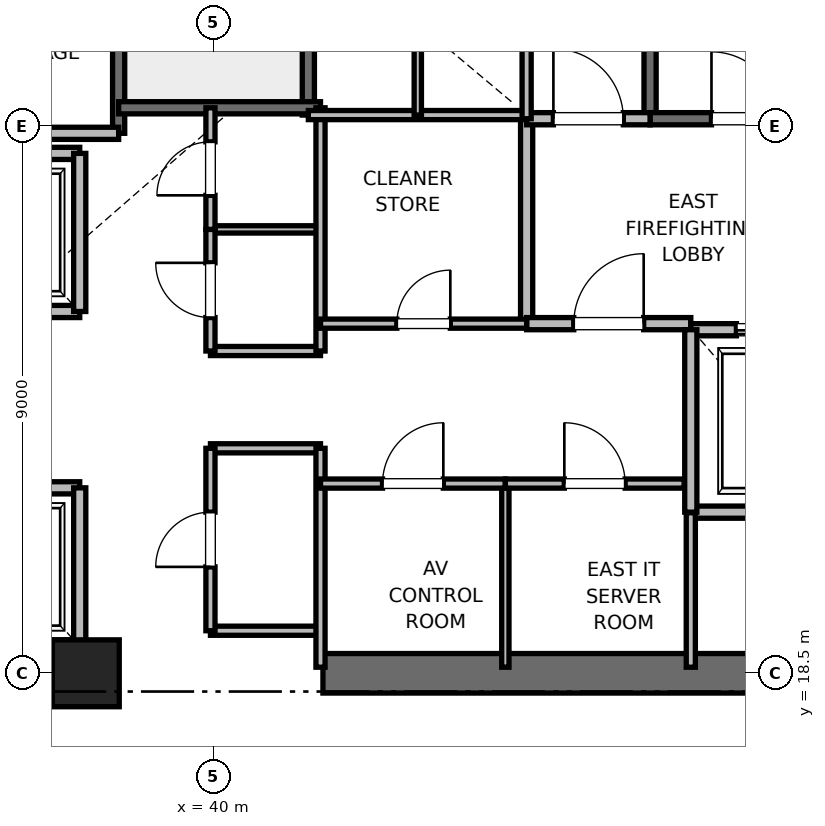
"""IFC4 building model, lengths in metres.
Left out: names, types, materials, properties, quantities, classifications, styles, units other than length and angle.
Written with IfcOpenShell. Run it as: python <this file> out.ifc"""

import sys

from ifc_helpers import new_model, si_unit, direction, frame, frame_2d, origin, origin_2d, place, context, subcontext, project, spatial, rectangle, extrude, element, fill, save


model = new_model("IFC4")
c1 = context("Model", 3, precision=1e-05, world=origin(), true_north=direction((0.0, 1.0)))
c2 = subcontext(c1, "Body", "Model", "MODEL_VIEW")
j1 = project(units=[si_unit("LENGTHUNIT", "METRE"), si_unit("PLANEANGLEUNIT", "RADIAN")], contexts=[c1])
p1 = place(None, origin())
s1 = spatial("IfcSite", under=j1, at=p1, CompositionType="ELEMENT")
p2 = place(p1, origin())
s2 = spatial("IfcBuilding", under=s1, at=p2, CompositionType="ELEMENT")
p3 = place(p2, frame((0.0, 0.0, 21.6)))
s3 = spatial("IfcBuildingStorey", under=s2, at=p3, CompositionType="ELEMENT", Elevation=21.6)
p4 = place(p3, frame((37.9, 18.5, 0.0), z_axis=(0.0, 0.0, 1.0), x_axis=(1.0, 0.0, 0.0)))
e1 = element("IfcColumn", 1, at=p4, inside=s3, PredefinedType="PILASTER", context=c2, shape_type="SweptSolid", body=[
    extrude(rectangle(XDim=1.1, YDim=1.1, at=origin_2d()), origin(), (0.0, 0.0, 1.0), 6.0),
])
for number, where, z_axis, x_axis in (
    (2, (29.0, 18.5, 0.0), (0.0, 0.0, 1.0), (1.0, 0.0, 0.0)),
    (3, (41.8, 18.5, 0.0), (0.0, 0.0, 1.0), (1.0, 0.0, 0.0)),
):
    element("IfcWall", number, at=place(p3, frame(where, z_axis=z_axis, x_axis=x_axis)), inside=s3, PredefinedType="SHEAR", context=c2, shape_type="SweptSolid", body=[
        extrude(rectangle(XDim=9.2, YDim=0.65, at=frame_2d((4.6, 0.0))), origin(), (0.0, 0.0, 1.0), 5.76),
    ])
p5 = place(p3, frame((47.18, 27.62, 0.0), z_axis=(0.0, 0.0, 1.0), x_axis=(0.0, 1.0, 0.0)))
e4 = element("IfcWall", 4, at=p5, inside=s3, PredefinedType="SOLIDWALL", context=c2, shape_type="SweptSolid", body=[
    extrude(rectangle(XDim=8.18, YDim=0.2, at=frame_2d((4.09, 0.0))), origin(), (0.0, 0.0, 1.0), 5.76),
])
p6 = place(p3, frame((47.18, 27.62, 0.0), z_axis=(0.0, 0.0, 1.0), x_axis=(1.0, 0.0, 0.0)))
e5 = element("IfcWall", 5, at=p6, inside=s3, PredefinedType="SOLIDWALL", context=c2, shape_type="SweptSolid", body=[
    extrude(rectangle(XDim=3.12, YDim=0.2, at=frame_2d((1.56, 0.0))), origin(), (0.0, 0.0, 1.0), 5.76),
])
p7 = place(p6, frame((1.01, 0.0, 0.0)))
e6 = element("IfcOpeningElement", 6, at=p7, cuts=e5, PredefinedType="OPENING", context=c2, shape_type="SweptSolid", body=[
    extrude(rectangle(XDim=1.1, YDim=2.15, at=frame_2d((0.55, 1.075))), frame((0.0, 0.1, 0.0), z_axis=(0.0, -1.0, 0.0), x_axis=(1.0, 0.0, 0.0)), (0.0, 0.0, 1.0), 0.2),
])
p8 = place(p3, frame((38.44, 27.38, 0.0), z_axis=(0.0, 0.0, 1.0), x_axis=(0.0, 1.0, 0.0)))
e7 = element("IfcWall", 7, at=p8, inside=s3, PredefinedType="SOLIDWALL", context=c2, shape_type="SweptSolid", body=[
    extrude(rectangle(XDim=8.87, YDim=0.2, at=frame_2d((4.435, 0.0))), origin(), (0.0, 0.0, 1.0), 5.76),
])
p9 = place(p3, frame((41.56, 27.68, 0.0), z_axis=(0.0, 0.0, 1.0), x_axis=(0.0, 1.0, 0.0)))
e8 = element("IfcWall", 8, at=p9, inside=s3, PredefinedType="SOLIDWALL", context=c2, shape_type="SweptSolid", body=[
    extrude(rectangle(XDim=8.57, YDim=0.2, at=frame_2d((4.285, 0.0))), origin(), (0.0, 0.0, 1.0), 5.76),
])
p10 = place(p3, frame((38.44, 27.8, 0.0), z_axis=(0.0, 0.0, 1.0), x_axis=(1.0, 0.0, 0.0)))
e9 = element("IfcWall", 9, at=p10, inside=s3, PredefinedType="SOLIDWALL", context=c2, shape_type="SweptSolid", body=[
    extrude(rectangle(XDim=3.32, YDim=0.2, at=frame_2d((1.66, 0.0))), origin(), (0.0, 0.0, 1.0), 5.76),
])
p11 = place(p3, frame((32.82, 27.38, 0.0), z_axis=(0.0, 0.0, 1.0), x_axis=(1.0, 0.0, 0.0)))
e10 = element("IfcWall", 10, at=p11, inside=s3, PredefinedType="PARTITIONING", context=c2, shape_type="SweptSolid", body=[
    extrude(rectangle(XDim=5.62, YDim=0.2, at=frame_2d((2.81, 0.0))), origin(), (0.0, 0.0, 1.0), 5.76),
])
p12 = place(p3, frame((45.15, 24.25, 0.0), z_axis=(0.0, 0.0, 1.0), x_axis=(0.0, 1.0, 0.0)))
e11 = element("IfcWall", 11, at=p12, inside=s3, PredefinedType="PARTITIONING", context=c2, shape_type="SweptSolid", body=[
    extrude(rectangle(XDim=3.37, YDim=0.2, at=frame_2d((1.685, 0.0))), origin(), (0.0, 0.0, 1.0), 5.76),
])
p13 = place(p3, frame((45.15, 24.25, 0.0), z_axis=(0.0, 0.0, 1.0), x_axis=(1.0, 0.0, 0.0)))
e12 = element("IfcWall", 12, at=p13, inside=s3, PredefinedType="PARTITIONING", context=c2, shape_type="SweptSolid", body=[
    extrude(rectangle(XDim=2.7, YDim=0.2, at=frame_2d((1.35, 0.0))), origin(), (0.0, 0.0, 1.0), 5.76),
])
p14 = place(p13, frame((0.775, 0.0, 0.0)))
e13 = element("IfcOpeningElement", 13, at=p14, cuts=e12, PredefinedType="OPENING", context=c2, shape_type="SweptSolid", body=[
    extrude(rectangle(XDim=1.15, YDim=2.2, at=frame_2d((0.575, 1.1))), frame((0.0, 0.1, 0.0), z_axis=(0.0, -1.0, 0.0), x_axis=(1.0, 0.0, 0.0)), (0.0, 0.0, 1.0), 0.2),
])
p15 = place(p3, frame((45.15, 27.62, 0.0), z_axis=(0.0, 0.0, 1.0), x_axis=(1.0, 0.0, 0.0)))
e14 = element("IfcWall", 14, at=p15, inside=s3, PredefinedType="PARTITIONING", context=c2, shape_type="SweptSolid", body=[
    extrude(rectangle(XDim=2.03, YDim=0.2, at=frame_2d((1.015, 0.0))), origin(), (0.0, 0.0, 1.0), 5.76),
])
p16 = place(p15, frame((0.44, 0.0, 0.0)))
e15 = element("IfcOpeningElement", 15, at=p16, cuts=e14, PredefinedType="OPENING", context=c2, shape_type="SweptSolid", body=[
    extrude(rectangle(XDim=1.15, YDim=2.2, at=frame_2d((0.575, 1.1))), frame((0.0, 0.1, 0.0), z_axis=(0.0, -1.0, 0.0), x_axis=(1.0, 0.0, 0.0)), (0.0, 0.0, 1.0), 0.2),
])
p17 = place(p3, frame((47.85, 21.15, 0.0), z_axis=(0.0, 0.0, 1.0), x_axis=(1.0, 0.0, 0.0)))
e16 = element("IfcWall", 16, at=p17, inside=s3, PredefinedType="SOLIDWALL", context=c2, shape_type="SweptSolid", body=[
    extrude(rectangle(XDim=2.6, YDim=0.2, at=frame_2d((1.3, 0.0))), origin(), (0.0, 0.0, 1.0), 5.76),
])
p18 = place(p3, frame((50.45, 24.15, 0.0), z_axis=(0.0, 0.0, 1.0), x_axis=(-1.0, 0.0, 0.0)))
e17 = element("IfcWall", 17, at=p18, inside=s3, PredefinedType="SOLIDWALL", context=c2, shape_type="SweptSolid", body=[
    extrude(rectangle(XDim=2.6, YDim=0.2, at=frame_2d((1.3, 0.0))), origin(), (0.0, 0.0, 1.0), 4.54),
])
p19 = place(p18, frame((0.75, 0.0, 0.0)))
e18 = element("IfcOpeningElement", 18, at=p19, cuts=e17, PredefinedType="OPENING", context=c2, shape_type="SweptSolid", body=[
    extrude(rectangle(XDim=1.1, YDim=2.2, at=frame_2d((0.55, 1.1))), frame((0.0, 0.1, 0.0), z_axis=(0.0, -1.0, 0.0), x_axis=(1.0, 0.0, 0.0)), (0.0, 0.0, 1.0), 0.2),
])
p20 = place(p3, frame((47.85, 24.15, 0.0), z_axis=(0.0, 0.0, 1.0), x_axis=(0.0, -1.0, 0.0)))
e19 = element("IfcWall", 19, at=p20, inside=s3, PredefinedType="SOLIDWALL", context=c2, shape_type="SweptSolid", body=[
    extrude(rectangle(XDim=3.0, YDim=0.2, at=frame_2d((1.5, 0.0))), origin(), (0.0, 0.0, 1.0), 5.76),
])
p21 = place(p3, frame((35.5, 18.95, 0.0), z_axis=(0.0, 0.0, 1.0), x_axis=(1.0, 0.0, 0.0)))
e20 = element("IfcWall", 20, at=p21, inside=s3, PredefinedType="SOLIDWALL", context=c2, shape_type="SweptSolid", body=[
    extrude(rectangle(XDim=2.3, YDim=0.2, at=frame_2d((1.15, 0.0))), origin(), (0.0, 0.0, 1.0), 4.54),
])
p22 = place(p3, frame((37.8, 21.55, 0.0), z_axis=(0.0, 0.0, 1.0), x_axis=(-1.0, 0.0, 0.0)))
e21 = element("IfcWall", 21, at=p22, inside=s3, PredefinedType="SOLIDWALL", context=c2, shape_type="SweptSolid", body=[
    extrude(rectangle(XDim=2.3, YDim=0.2, at=frame_2d((1.15, 0.0))), origin(), (0.0, 0.0, 1.0), 5.76),
])
p23 = place(p22, frame((0.6, 0.0, 0.0)))
e22 = element("IfcOpeningElement", 22, at=p23, cuts=e21, PredefinedType="OPENING", context=c2, shape_type="SweptSolid", body=[
    extrude(rectangle(XDim=1.1, YDim=2.2, at=frame_2d((0.55, 1.1))), frame((0.0, 0.1, 0.0), z_axis=(0.0, -1.0, 0.0), x_axis=(1.0, 0.0, 0.0)), (0.0, 0.0, 1.0), 0.2),
])
p24 = place(p3, frame((37.8, 18.95, 0.0), z_axis=(0.0, 0.0, 1.0), x_axis=(0.0, 1.0, 0.0)))
e23 = element("IfcWall", 23, at=p24, inside=s3, PredefinedType="SOLIDWALL", context=c2, shape_type="SweptSolid", body=[
    extrude(rectangle(XDim=2.6, YDim=0.2, at=frame_2d((1.3, 0.0))), origin(), (0.0, 0.0, 1.0), 4.54),
])
p25 = place(p3, frame((35.5, 24.45, 0.0), z_axis=(0.0, 0.0, 1.0), x_axis=(1.0, 0.0, 0.0)))
e24 = element("IfcWall", 24, at=p25, inside=s3, PredefinedType="SOLIDWALL", context=c2, shape_type="SweptSolid", body=[
    extrude(rectangle(XDim=2.3, YDim=0.2, at=frame_2d((1.15, 0.0))), origin(), (0.0, 0.0, 1.0), 5.76),
])
p26 = place(p25, frame((0.6, 0.0, 0.0)))
e25 = element("IfcOpeningElement", 25, at=p26, cuts=e24, PredefinedType="OPENING", context=c2, shape_type="SweptSolid", body=[
    extrude(rectangle(XDim=1.1, YDim=2.2, at=frame_2d((0.55, 1.1))), frame((0.0, 0.1, 0.0), z_axis=(0.0, -1.0, 0.0), x_axis=(1.0, 0.0, 0.0)), (0.0, 0.0, 1.0), 0.2),
])
p27 = place(p3, frame((37.8, 27.05, 0.0), z_axis=(0.0, 0.0, 1.0), x_axis=(-1.0, 0.0, 0.0)))
e26 = element("IfcWall", 26, at=p27, inside=s3, PredefinedType="SOLIDWALL", context=c2, shape_type="SweptSolid", body=[
    extrude(rectangle(XDim=2.3, YDim=0.2, at=frame_2d((1.15, 0.0))), origin(), (0.0, 0.0, 1.0), 5.76),
])
p28 = place(p3, frame((37.8, 24.45, 0.0), z_axis=(0.0, 0.0, 1.0), x_axis=(0.0, 1.0, 0.0)))
e27 = element("IfcWall", 27, at=p28, inside=s3, PredefinedType="SOLIDWALL", context=c2, shape_type="SweptSolid", body=[
    extrude(rectangle(XDim=2.6, YDim=0.2, at=frame_2d((1.3, 0.0))), origin(), (0.0, 0.0, 1.0), 5.76),
])
for number, where, z_axis, x_axis in (
    (28, (39.95, 19.2, 0.0), (0.0, 0.0, 1.0), (1.0, 0.0, 0.0)),
    (29, (39.95, 22.2, 0.0), (0.0, 0.0, 1.0), (1.0, 0.0, 0.0)),
    (30, (39.95, 23.8, 0.0), (0.0, 0.0, 1.0), (1.0, 0.0, 0.0)),
):
    element("IfcWall", number, at=place(p3, frame(where, z_axis=z_axis, x_axis=x_axis)), inside=s3, PredefinedType="PARTITIONING", context=c2, shape_type="SweptSolid", body=[
        extrude(rectangle(XDim=1.81, YDim=0.15, at=frame_2d((0.905, 0.0))), origin(), (0.0, 0.0, 1.0), 2.85),
    ])
p29 = place(p3, frame((39.95, 25.8, 0.0), z_axis=(0.0, 0.0, 1.0), x_axis=(1.0, 0.0, 0.0)))
e31 = element("IfcWall", 31, at=p29, inside=s3, PredefinedType="PARTITIONING", context=c2, shape_type="SweptSolid", body=[
    extrude(rectangle(XDim=1.81, YDim=0.12, at=frame_2d((0.905, 0.0))), origin(), (0.0, 0.0, 1.0), 2.85),
])
p30 = place(p3, frame((41.76, 18.6, 0.0), z_axis=(0.0, 0.0, 1.0), x_axis=(0.0, 1.0, 0.0)))
e32 = element("IfcWall", 32, at=p30, inside=s3, PredefinedType="PARTITIONING", context=c2, shape_type="SweptSolid", body=[
    extrude(rectangle(XDim=3.6, YDim=0.15, at=frame_2d((1.8, 0.0))), origin(), (0.0, 0.0, 1.0), 2.85),
])
p31 = place(p3, frame((41.76, 23.8, 0.0), z_axis=(0.0, 0.0, 1.0), x_axis=(0.0, 1.0, 0.0)))
e33 = element("IfcWall", 33, at=p31, inside=s3, PredefinedType="PARTITIONING", context=c2, shape_type="SweptSolid", body=[
    extrude(rectangle(XDim=4.0, YDim=0.15, at=frame_2d((2.0, 0.0))), origin(), (0.0, 0.0, 1.0), 2.85),
])
p32 = place(p3, frame((39.95, 19.2, 0.0), z_axis=(0.0, 0.0, 1.0), x_axis=(0.0, 1.0, 0.0)))
e34 = element("IfcWall", 34, at=p32, inside=s3, PredefinedType="PARTITIONING", context=c2, shape_type="SweptSolid", body=[
    extrude(rectangle(XDim=3.0, YDim=0.15, at=frame_2d((1.5, 0.0))), origin(), (0.0, 0.0, 1.0), 2.85),
])
p33 = place(p32, frame((1.05, 0.0, 0.0)))
e35 = element("IfcOpeningElement", 35, at=p33, cuts=e34, PredefinedType="OPENING", context=c2, shape_type="SweptSolid", body=[
    extrude(rectangle(XDim=0.9, YDim=2.1, at=frame_2d((0.45, 1.05))), frame((0.0, 0.075, 0.0), z_axis=(0.0, -1.0, 0.0), x_axis=(1.0, 0.0, 0.0)), (0.0, 0.0, 1.0), 0.15),
])
p34 = place(p3, frame((39.95, 23.8, 0.0), z_axis=(0.0, 0.0, 1.0), x_axis=(0.0, 1.0, 0.0)))
e36 = element("IfcWall", 36, at=p34, inside=s3, PredefinedType="PARTITIONING", context=c2, shape_type="SweptSolid", body=[
    extrude(rectangle(XDim=2.0, YDim=0.15, at=frame_2d((1.0, 0.0))), origin(), (0.0, 0.0, 1.0), 2.85),
])
p35 = place(p34, frame((0.55, 0.0, 0.0)))
e37 = element("IfcOpeningElement", 37, at=p35, cuts=e36, PredefinedType="OPENING", context=c2, shape_type="SweptSolid", body=[
    extrude(rectangle(XDim=0.9, YDim=2.1, at=frame_2d((0.45, 1.05))), frame((0.0, 0.075, 0.0), z_axis=(0.0, -1.0, 0.0), x_axis=(1.0, 0.0, 0.0)), (0.0, 0.0, 1.0), 0.15),
])
p36 = place(p3, frame((39.95, 25.8, 0.0), z_axis=(0.0, 0.0, 1.0), x_axis=(0.0, 1.0, 0.0)))
e38 = element("IfcWall", 38, at=p36, inside=s3, PredefinedType="PARTITIONING", context=c2, shape_type="SweptSolid", body=[
    extrude(rectangle(XDim=2.0, YDim=0.15, at=frame_2d((1.0, 0.0))), origin(), (0.0, 0.0, 1.0), 2.85),
])
p37 = place(p36, frame((0.56, 0.0, 0.0)))
e39 = element("IfcOpeningElement", 39, at=p37, cuts=e38, PredefinedType="OPENING", context=c2, shape_type="SweptSolid", body=[
    extrude(rectangle(XDim=0.88, YDim=2.1, at=frame_2d((0.44, 1.05))), frame((0.0, 0.075, 0.0), z_axis=(0.0, -1.0, 0.0), x_axis=(1.0, 0.0, 0.0)), (0.0, 0.0, 1.0), 0.15),
])
p38 = place(p3, frame((41.56, 27.68, 0.0), z_axis=(0.0, 0.0, 1.0), x_axis=(1.0, 0.0, 0.0)))
e40 = element("IfcWall", 40, at=p38, inside=s3, PredefinedType="PARTITIONING", context=c2, shape_type="SweptSolid", body=[
    extrude(rectangle(XDim=3.59, YDim=0.15, at=frame_2d((1.795, 0.0))), origin(), (0.0, 0.0, 1.0), 2.85),
])
p39 = place(p3, frame((47.85, 18.6, 0.0), z_axis=(0.0, 0.0, 1.0), x_axis=(0.0, 1.0, 0.0)))
e41 = element("IfcWall", 41, at=p39, inside=s3, PredefinedType="PARTITIONING", context=c2, shape_type="SweptSolid", body=[
    extrude(rectangle(XDim=2.54, YDim=0.15, at=frame_2d((1.27, 0.0))), origin(), (0.0, 0.0, 1.0), 2.85),
])
p40 = place(p3, frame((44.8, 18.6, 0.0), z_axis=(0.0, 0.0, 1.0), x_axis=(0.0, 1.0, 0.0)))
e42 = element("IfcWall", 42, at=p40, inside=s3, PredefinedType="PARTITIONING", context=c2, shape_type="SweptSolid", body=[
    extrude(rectangle(XDim=3.02, YDim=0.12, at=frame_2d((1.51, 0.0))), origin(), (0.0, 0.0, 1.0), 2.85),
])
p41 = place(p3, frame((41.76, 21.62, 0.0), z_axis=(0.0, 0.0, 1.0), x_axis=(1.0, 0.0, 0.0)))
e43 = element("IfcWall", 43, at=p41, inside=s3, PredefinedType="PARTITIONING", context=c2, shape_type="SweptSolid", body=[
    extrude(rectangle(XDim=3.04, YDim=0.15, at=frame_2d((1.52, 0.0))), origin(), (0.0, 0.0, 1.0), 2.85),
])
p42 = place(p41, frame((1.02, 0.0, 0.0)))
e44 = element("IfcOpeningElement", 44, at=p42, cuts=e43, PredefinedType="OPENING", context=c2, shape_type="SweptSolid", body=[
    extrude(rectangle(XDim=1.0, YDim=2.15, at=frame_2d((0.5, 1.075))), frame((0.0, 0.075, 0.0), z_axis=(0.0, -1.0, 0.0), x_axis=(1.0, 0.0, 0.0)), (0.0, 0.0, 1.0), 0.15),
])
p43 = place(p3, frame((44.8, 21.62, 0.0), z_axis=(0.0, 0.0, 1.0), x_axis=(1.0, 0.0, 0.0)))
e45 = element("IfcWall", 45, at=p43, inside=s3, PredefinedType="PARTITIONING", context=c2, shape_type="SweptSolid", body=[
    extrude(rectangle(XDim=2.94, YDim=0.15, at=frame_2d((1.47, 0.0))), origin(), (0.0, 0.0, 1.0), 2.85),
])
p44 = place(p43, frame((0.97, 0.0, 0.0)))
e46 = element("IfcOpeningElement", 46, at=p44, cuts=e45, PredefinedType="OPENING", context=c2, shape_type="SweptSolid", body=[
    extrude(rectangle(XDim=1.0, YDim=2.15, at=frame_2d((0.5, 1.075))), frame((0.0, 0.075, 0.0), z_axis=(0.0, -1.0, 0.0), x_axis=(1.0, 0.0, 0.0)), (0.0, 0.0, 1.0), 0.15),
])
p45 = place(p3, frame((41.76, 24.25, 0.0), z_axis=(0.0, 0.0, 1.0), x_axis=(1.0, 0.0, 0.0)))
e47 = element("IfcWall", 47, at=p45, inside=s3, PredefinedType="PARTITIONING", context=c2, shape_type="SweptSolid", body=[
    extrude(rectangle(XDim=3.39, YDim=0.15, at=frame_2d((1.695, 0.0))), origin(), (0.0, 0.0, 1.0), 2.85),
])
p46 = place(p45, frame((1.255, 0.0, 0.0)))
e48 = element("IfcOpeningElement", 48, at=p46, cuts=e47, PredefinedType="OPENING", context=c2, shape_type="SweptSolid", body=[
    extrude(rectangle(XDim=0.88, YDim=2.1, at=frame_2d((0.44, 1.05))), frame((0.0, 0.075, 0.0), z_axis=(0.0, -1.0, 0.0), x_axis=(1.0, 0.0, 0.0)), (0.0, 0.0, 1.0), 0.15),
])
p47 = place(p3, frame((45.15, 27.62, 0.0), z_axis=(0.0, 0.0, 1.0), x_axis=(0.0, 1.0, 0.0)))
e49 = element("IfcWall", 49, at=p47, inside=s3, PredefinedType="PARTITIONING", context=c2, shape_type="SweptSolid", body=[
    extrude(rectangle(XDim=3.1, YDim=0.15, at=frame_2d((1.55, 0.0))), origin(), (0.0, 0.0, 1.0), 2.85),
])
p48 = place(p3, frame((43.36, 27.68, 0.0), z_axis=(0.0, 0.0, 1.0), x_axis=(0.0, 1.0, 0.0)))
e50 = element("IfcWall", 50, at=p48, inside=s3, PredefinedType="PARTITIONING", context=c2, shape_type="SweptSolid", body=[
    extrude(rectangle(XDim=3.04, YDim=0.12, at=frame_2d((1.52, 0.0))), origin(), (0.0, 0.0, 1.0), 2.85),
])
p49 = place(p7, origin())
e51 = element("IfcDoor", 51, at=p49, inside=s3, OperationType="SINGLE_SWING_LEFT", PredefinedType="DOOR", context=c2, shape_type="SweptSolid", body=[
    extrude(rectangle(XDim=1.1, YDim=2.15, at=frame_2d((0.55, 1.075))), frame((0.0, 0.025, 0.0), z_axis=(0.0, -1.0, 0.0), x_axis=(1.0, 0.0, 0.0)), (0.0, 0.0, 1.0), 0.05),
])
fill(e6, e51)
p50 = place(p14, origin())
e52 = element("IfcDoor", 52, at=p50, inside=s3, OperationType="SINGLE_SWING_RIGHT", PredefinedType="DOOR", context=c2, shape_type="SweptSolid", body=[
    extrude(rectangle(XDim=1.15, YDim=2.2, at=frame_2d((0.575, 1.1))), frame((0.0, 0.025, 0.0), z_axis=(0.0, -1.0, 0.0), x_axis=(1.0, 0.0, 0.0)), (0.0, 0.0, 1.0), 0.05),
])
fill(e13, e52)
p51 = place(p16, origin())
e53 = element("IfcDoor", 53, at=p51, inside=s3, OperationType="SINGLE_SWING_LEFT", PredefinedType="DOOR", context=c2, shape_type="SweptSolid", body=[
    extrude(rectangle(XDim=1.15, YDim=2.2, at=frame_2d((0.575, 1.1))), frame((0.0, 0.025, 0.0), z_axis=(0.0, -1.0, 0.0), x_axis=(1.0, 0.0, 0.0)), (0.0, 0.0, 1.0), 0.05),
])
fill(e15, e53)
p52 = place(p19, origin())
e54 = element("IfcDoor", 54, at=p52, inside=s3, OperationType="SLIDING_TO_RIGHT", PredefinedType="DOOR", context=c2, shape_type="SweptSolid", body=[
    extrude(rectangle(XDim=1.1, YDim=2.2, at=frame_2d((0.55, 1.1))), frame((0.0, 0.025, 0.0), z_axis=(0.0, -1.0, 0.0), x_axis=(1.0, 0.0, 0.0)), (0.0, 0.0, 1.0), 0.05),
])
fill(e18, e54)
p53 = place(p33, origin())
e55 = element("IfcDoor", 55, at=p53, inside=s3, OperationType="SINGLE_SWING_LEFT", PredefinedType="DOOR", context=c2, shape_type="SweptSolid", body=[
    extrude(rectangle(XDim=0.9, YDim=2.1, at=frame_2d((0.45, 1.05))), frame((0.0, 0.025, 0.0), z_axis=(0.0, -1.0, 0.0), x_axis=(1.0, 0.0, 0.0)), (0.0, 0.0, 1.0), 0.05),
])
fill(e35, e55)
p54 = place(p35, origin())
e56 = element("IfcDoor", 56, at=p54, inside=s3, OperationType="SINGLE_SWING_RIGHT", PredefinedType="DOOR", context=c2, shape_type="SweptSolid", body=[
    extrude(rectangle(XDim=0.9, YDim=2.1, at=frame_2d((0.45, 1.05))), frame((0.0, 0.025, 0.0), z_axis=(0.0, -1.0, 0.0), x_axis=(1.0, 0.0, 0.0)), (0.0, 0.0, 1.0), 0.05),
])
fill(e37, e56)
p55 = place(p37, origin())
e57 = element("IfcDoor", 57, at=p55, inside=s3, OperationType="SINGLE_SWING_LEFT", PredefinedType="DOOR", context=c2, shape_type="SweptSolid", body=[
    extrude(rectangle(XDim=0.88, YDim=2.1, at=frame_2d((0.44, 1.05))), frame((0.0, 0.025, 0.0), z_axis=(0.0, -1.0, 0.0), x_axis=(1.0, 0.0, 0.0)), (0.0, 0.0, 1.0), 0.05),
])
fill(e39, e57)
p56 = place(p42, origin())
e58 = element("IfcDoor", 58, at=p56, inside=s3, OperationType="SINGLE_SWING_RIGHT", PredefinedType="DOOR", context=c2, shape_type="SweptSolid", body=[
    extrude(rectangle(XDim=1.0, YDim=2.15, at=frame_2d((0.5, 1.075))), frame((0.0, 0.025, 0.0), z_axis=(0.0, -1.0, 0.0), x_axis=(1.0, 0.0, 0.0)), (0.0, 0.0, 1.0), 0.05),
])
fill(e44, e58)
p57 = place(p44, origin())
e59 = element("IfcDoor", 59, at=p57, inside=s3, OperationType="SINGLE_SWING_LEFT", PredefinedType="DOOR", context=c2, shape_type="SweptSolid", body=[
    extrude(rectangle(XDim=1.0, YDim=2.15, at=frame_2d((0.5, 1.075))), frame((0.0, 0.025, 0.0), z_axis=(0.0, -1.0, 0.0), x_axis=(1.0, 0.0, 0.0)), (0.0, 0.0, 1.0), 0.05),
])
fill(e46, e59)
p58 = place(p46, origin())
e60 = element("IfcDoor", 60, at=p58, inside=s3, OperationType="SINGLE_SWING_RIGHT", PredefinedType="DOOR", context=c2, shape_type="SweptSolid", body=[
    extrude(rectangle(XDim=0.88, YDim=2.1, at=frame_2d((0.44, 1.05))), frame((0.0, 0.025, 0.0), z_axis=(0.0, -1.0, 0.0), x_axis=(1.0, 0.0, 0.0)), (0.0, 0.0, 1.0), 0.05),
])
fill(e48, e60)
save(model, sys.argv[1])
